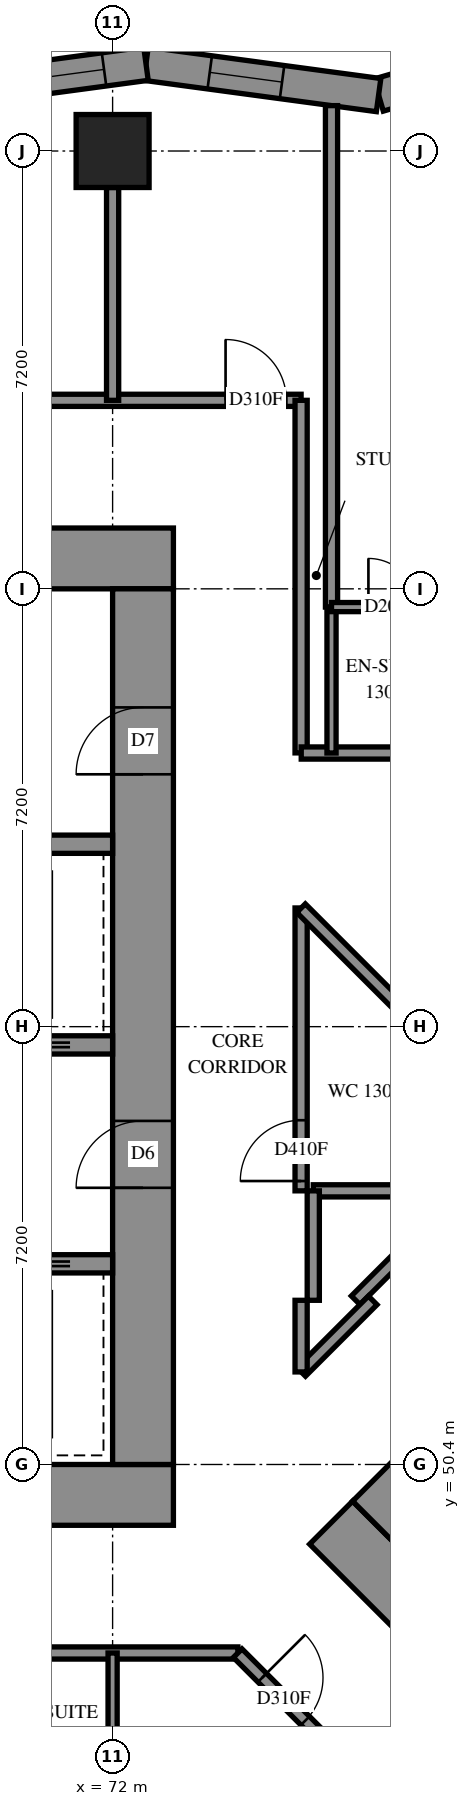
"""IFC4 building model, lengths in metres.
Left out: names, types, materials, properties, quantities, classifications, styles, units other than length and angle.
Written with IfcOpenShell. Run it as: python <this file> out.ifc"""

import sys

from ifc_helpers import new_model, si_unit, direction, frame, frame_2d, origin, origin_2d, place, context, subcontext, project, spatial, polyline, rectangle, outline, extrude, element, fill, save


model = new_model("IFC4")
c1 = context("Model", 3, precision=1e-05, world=origin(), true_north=direction((0.0, 1.0)))
c2 = subcontext(c1, "Body", "Model", "MODEL_VIEW")
j1 = project(units=[si_unit("LENGTHUNIT", "METRE"), si_unit("PLANEANGLEUNIT", "RADIAN")], contexts=[c1])
p1 = place(None, origin())
s1 = spatial("IfcSite", under=j1, at=p1, CompositionType="ELEMENT")
p2 = place(p1, origin())
s2 = spatial("IfcBuilding", under=s1, at=p2, CompositionType="ELEMENT")
p3 = place(p2, frame((0.0, 0.0, 50.8)))
s3 = spatial("IfcBuildingStorey", under=s2, at=p3, CompositionType="ELEMENT", Elevation=50.8)
p4 = place(p3, frame((72.0, 72.0, 0.0), z_axis=(0.0, 0.0, 1.0), x_axis=(1.0, 0.0, 0.0)))
e1 = element("IfcColumn", 1, at=p4, inside=s3, PredefinedType="COLUMN", context=c2, shape_type="SweptSolid", body=[
    extrude(rectangle(XDim=1.2, YDim=1.2, at=origin_2d()), origin(), (0.0, 0.0, 1.0), 3.1),
])
p5 = place(p3, frame((56.6, 49.9, -0.3), z_axis=(0.0, 0.0, 1.0), x_axis=(1.0, 0.0, 0.0)))
e2 = element("IfcWall", 2, at=p5, inside=s3, PredefinedType="SHEAR", context=c2, shape_type="SweptSolid", body=[
    extrude(rectangle(XDim=16.4, YDim=1.0, at=frame_2d((8.2, 0.0))), origin(), (0.0, 0.0, 1.0), 2.7),
])
p6 = place(p3, frame((56.6, 65.3, -0.3), z_axis=(0.0, 0.0, 1.0), x_axis=(1.0, 0.0, 0.0)))
e3 = element("IfcWall", 3, at=p6, inside=s3, PredefinedType="SHEAR", context=c2, shape_type="SweptSolid", body=[
    extrude(rectangle(XDim=16.4, YDim=1.0, at=frame_2d((8.2, 0.0))), origin(), (0.0, 0.0, 1.0), 2.7),
])
p7 = place(p6, frame((11.0, 0.0, 0.3)))
e4 = element("IfcOpeningElement", 4, at=p7, cuts=e3, PredefinedType="OPENING", context=c2, shape_type="SweptSolid", body=[
    extrude(rectangle(XDim=0.8, YDim=2.1, at=frame_2d((0.4, 1.05))), frame((0.0, 0.51, 0.0), z_axis=(0.0, -1.0, 0.0), x_axis=(1.0, 0.0, 0.0)), (0.0, 0.0, 1.0), 1.02),
])
p8 = place(p3, frame((72.5, 50.4, -0.3), z_axis=(0.0, 0.0, 1.0), x_axis=(0.0, 1.0, 0.0)))
e5 = element("IfcWall", 5, at=p8, inside=s3, PredefinedType="SHEAR", context=c2, shape_type="SweptSolid", body=[
    extrude(rectangle(XDim=14.4, YDim=1.0, at=frame_2d((7.2, 0.0))), origin(), (0.0, 0.0, 1.0), 2.7),
])
p9 = place(p8, frame((4.55, 0.0, 0.3)))
e6 = element("IfcOpeningElement", 6, at=p9, cuts=e5, PredefinedType="OPENING", context=c2, shape_type="SweptSolid", body=[
    extrude(rectangle(XDim=1.1, YDim=2.1, at=frame_2d((0.55, 1.05))), frame((0.0, 0.51, 0.0), z_axis=(0.0, -1.0, 0.0), x_axis=(1.0, 0.0, 0.0)), (0.0, 0.0, 1.0), 1.02),
])
p10 = place(p8, frame((11.35, 0.0, 0.3)))
e7 = element("IfcOpeningElement", 7, at=p10, cuts=e5, PredefinedType="OPENING", context=c2, shape_type="SweptSolid", body=[
    extrude(rectangle(XDim=1.1, YDim=2.1, at=frame_2d((0.55, 1.05))), frame((0.0, 0.51, 0.0), z_axis=(0.0, -1.0, 0.0), x_axis=(1.0, 0.0, 0.0)), (0.0, 0.0, 1.0), 1.02),
])
p11 = place(p3, frame((57.6, 53.7, 0.0), z_axis=(0.0, 0.0, 1.0), x_axis=(1.0, 0.0, 0.0)))
e8 = element("IfcWall", 8, at=p11, inside=s3, PredefinedType="SOLIDWALL", context=c2, shape_type="SweptSolid", body=[
    extrude(rectangle(XDim=14.4, YDim=0.3, at=frame_2d((7.2, 0.0))), origin(), (0.0, 0.0, 1.0), 3.1),
])
p12 = place(p11, frame((1.25, 0.0, 0.0)))
e9 = element("IfcOpeningElement", 9, at=p12, cuts=e8, PredefinedType="OPENING", context=c2, shape_type="SweptSolid", body=[
    extrude(rectangle(XDim=1.1, YDim=2.1, at=frame_2d((0.55, 1.05))), frame((0.0, 0.16, 0.0), z_axis=(0.0, -1.0, 0.0), x_axis=(1.0, 0.0, 0.0)), (0.0, 0.0, 1.0), 0.32),
])
p13 = place(p11, frame((4.85, 0.0, 0.0)))
e10 = element("IfcOpeningElement", 10, at=p13, cuts=e8, PredefinedType="OPENING", context=c2, shape_type="SweptSolid", body=[
    extrude(rectangle(XDim=1.1, YDim=2.1, at=frame_2d((0.55, 1.05))), frame((0.0, 0.16, 0.0), z_axis=(0.0, -1.0, 0.0), x_axis=(1.0, 0.0, 0.0)), (0.0, 0.0, 1.0), 0.32),
])
p14 = place(p11, frame((8.45, 0.0, 0.0)))
e11 = element("IfcOpeningElement", 11, at=p14, cuts=e8, PredefinedType="OPENING", context=c2, shape_type="SweptSolid", body=[
    extrude(rectangle(XDim=1.1, YDim=2.1, at=frame_2d((0.55, 1.05))), frame((0.0, 0.16, 0.0), z_axis=(0.0, -1.0, 0.0), x_axis=(1.0, 0.0, 0.0)), (0.0, 0.0, 1.0), 0.32),
])
p15 = place(p11, frame((12.05, 0.0, 0.0)))
e12 = element("IfcOpeningElement", 12, at=p15, cuts=e8, PredefinedType="OPENING", context=c2, shape_type="SweptSolid", body=[
    extrude(rectangle(XDim=1.1, YDim=2.1, at=frame_2d((0.55, 1.05))), frame((0.0, 0.16, 0.0), z_axis=(0.0, -1.0, 0.0), x_axis=(1.0, 0.0, 0.0)), (0.0, 0.0, 1.0), 0.32),
])
p16 = place(p3, frame((57.6, 57.3, 0.0), z_axis=(0.0, 0.0, 1.0), x_axis=(1.0, 0.0, 0.0)))
e13 = element("IfcWall", 13, at=p16, inside=s3, PredefinedType="SOLIDWALL", context=c2, shape_type="SweptSolid", body=[
    extrude(rectangle(XDim=14.4, YDim=0.3, at=frame_2d((7.2, 0.0))), origin(), (0.0, 0.0, 1.0), 3.1),
])
p17 = place(p16, frame((12.05, 0.0, 0.0)))
e14 = element("IfcOpeningElement", 14, at=p17, cuts=e13, PredefinedType="OPENING", context=c2, shape_type="SweptSolid", body=[
    extrude(rectangle(XDim=1.1, YDim=2.1, at=frame_2d((0.55, 1.05))), frame((0.0, 0.16, 0.0), z_axis=(0.0, -1.0, 0.0), x_axis=(1.0, 0.0, 0.0)), (0.0, 0.0, 1.0), 0.32),
])
p18 = place(p3, frame((64.8, 60.6, 0.0), z_axis=(0.0, 0.0, 1.0), x_axis=(1.0, 0.0, 0.0)))
e15 = element("IfcWall", 15, at=p18, inside=s3, PredefinedType="SOLIDWALL", context=c2, shape_type="SweptSolid", body=[
    extrude(rectangle(XDim=7.2, YDim=0.3, at=frame_2d((3.6, 0.0))), origin(), (0.0, 0.0, 1.0), 3.1),
])
p19 = place(p3, frame((75.594, 49.443, -0.3), z_axis=(0.0, 0.0, 1.0), x_axis=(0.7071037324, -0.70710983, 0.0)))
e16 = element("IfcWall", 16, at=p19, inside=s3, PredefinedType="SHEAR", context=c2, shape_type="SweptSolid", body=[
    extrude(rectangle(XDim=16.4, YDim=1.0, at=frame_2d((8.2, 0.0))), origin(), (0.0, 0.0, 1.0), 2.7),
])
p20 = place(p3, frame((76.301, 49.443, -0.3), z_axis=(0.0, 0.0, 1.0), x_axis=(0.7071067812, 0.7071067812, 0.0)))
e17 = element("IfcWall", 17, at=p20, inside=s3, PredefinedType="SHEAR", context=c2, shape_type="SweptSolid", body=[
    extrude(rectangle(XDim=14.4, YDim=1.0, at=frame_2d((7.2, 0.0))), origin(), (0.0, 0.0, 1.0), 2.7),
])
p21 = place(p20, frame((4.55, 0.0, 0.3)))
e18 = element("IfcOpeningElement", 18, at=p21, cuts=e17, PredefinedType="OPENING", context=c2, shape_type="SweptSolid", body=[
    extrude(rectangle(XDim=1.1, YDim=2.1, at=frame_2d((0.55, 1.05))), frame((0.0, 0.51, 0.0), z_axis=(0.0, -1.0, 0.0), x_axis=(1.0, 0.0, 0.0)), (0.0, 0.0, 1.0), 1.02),
])
p22 = place(p20, frame((11.35, 0.0, 0.3)))
e19 = element("IfcOpeningElement", 19, at=p22, cuts=e17, PredefinedType="OPENING", context=c2, shape_type="SweptSolid", body=[
    extrude(rectangle(XDim=1.1, YDim=2.1, at=frame_2d((0.55, 1.05))), frame((0.0, 0.51, 0.0), z_axis=(0.0, -1.0, 0.0), x_axis=(1.0, 0.0, 0.0)), (0.0, 0.0, 1.0), 1.02),
])
p23 = place(p3, frame((80.016, 73.984, 0.0), z_axis=(0.0, 0.0, 1.0), x_axis=(-0.9598383765, -0.280553544, 0.0)))
e20 = element("IfcWall", 20, at=p23, inside=s3, PredefinedType="SOLIDWALL", context=c2, shape_type="SweptSolid", body=[
    extrude(outline(polyline([(-0.228, -0.275), (3.736, -0.275), (3.853, 0.275), (0.228, 0.275), (-0.228, -0.275)])), origin(), (0.0, 0.0, 1.0), 3.1),
])
p24 = place(p23, frame((1.622, 0.0, 0.5)))
e21 = element("IfcOpeningElement", 21, at=p24, cuts=e20, PredefinedType="OPENING", context=c2, shape_type="SweptSolid", body=[
    extrude(rectangle(XDim=1.2, YDim=2.45, at=frame_2d((0.6, 1.225))), frame((0.0, 0.285, 0.0), z_axis=(0.0, -1.0, 0.0), x_axis=(1.0, 0.0, 0.0)), (0.0, 0.0, 1.0), 0.57),
])
p25 = place(p3, frame((76.374, 72.92, 0.0), z_axis=(0.0, 0.0, 1.0), x_axis=(-0.9910665233, 0.1333684607, 0.0)))
e22 = element("IfcWall", 22, at=p25, inside=s3, PredefinedType="SOLIDWALL", context=c2, shape_type="SweptSolid", body=[
    extrude(outline(polyline([(0.058, -0.275), (3.897, -0.275), (3.823, 0.275), (-0.058, 0.275), (0.058, -0.275)])), origin(), (0.0, 0.0, 1.0), 3.1),
])
p26 = place(p25, frame((1.602, 0.0, 0.5)))
e23 = element("IfcOpeningElement", 23, at=p26, cuts=e22, PredefinedType="OPENING", context=c2, shape_type="SweptSolid", body=[
    extrude(rectangle(XDim=1.2, YDim=2.45, at=frame_2d((0.6, 1.225))), frame((0.0, 0.285, 0.0), z_axis=(0.0, -1.0, 0.0), x_axis=(1.0, 0.0, 0.0)), (0.0, 0.0, 1.0), 0.57),
])
p27 = place(p3, frame((72.549, 73.434, 0.0), z_axis=(0.0, 0.0, 1.0), x_axis=(-0.9910651652, -0.1333785524, 0.0)))
e24 = element("IfcWall", 24, at=p27, inside=s3, PredefinedType="SOLIDWALL", context=c2, shape_type="SweptSolid", body=[
    extrude(outline(polyline([(-0.037, -0.275), (3.802, -0.275), (3.876, 0.275), (0.037, 0.275), (-0.037, -0.275)])), origin(), (0.0, 0.0, 1.0), 3.1),
])
p28 = place(p27, frame((0.696, 0.0, 0.5)))
e25 = element("IfcOpeningElement", 25, at=p28, cuts=e24, PredefinedType="OPENING", context=c2, shape_type="SweptSolid", body=[
    extrude(rectangle(XDim=2.8, YDim=2.45, at=frame_2d((1.4, 1.225))), frame((0.0, 0.285, 0.0), z_axis=(0.0, -1.0, 0.0), x_axis=(1.0, 0.0, 0.0)), (0.0, 0.0, 1.0), 0.57),
])
p29 = place(p3, frame((54.5, 67.9, 0.0), z_axis=(0.0, 0.0, 1.0), x_axis=(1.0, 0.0, 0.0)))
e26 = element("IfcWall", 26, at=p29, inside=s3, PredefinedType="PARTITIONING", context=c2, shape_type="SweptSolid", body=[
    extrude(rectangle(XDim=20.6, YDim=0.2, at=frame_2d((10.3, 0.0))), origin(), (0.0, 0.0, 1.0), 3.1),
])
p30 = place(p29, frame((0.198, 0.0, 0.0)))
e27 = element("IfcOpeningElement", 27, at=p30, cuts=e26, PredefinedType="OPENING", context=c2, shape_type="SweptSolid", body=[
    extrude(rectangle(XDim=1.0, YDim=2.1, at=frame_2d((0.5, 1.05))), frame((0.0, 0.11, 0.0), z_axis=(0.0, -1.0, 0.0), x_axis=(1.0, 0.0, 0.0)), (0.0, 0.0, 1.0), 0.22),
])
p31 = place(p29, frame((19.358, 0.0, 0.0)))
e28 = element("IfcOpeningElement", 28, at=p31, cuts=e26, PredefinedType="OPENING", context=c2, shape_type="SweptSolid", body=[
    extrude(rectangle(XDim=1.0, YDim=2.1, at=frame_2d((0.5, 1.05))), frame((0.0, 0.11, 0.0), z_axis=(0.0, -1.0, 0.0), x_axis=(1.0, 0.0, 0.0)), (0.0, 0.0, 1.0), 0.22),
])
p32 = place(p29, frame((6.698, 0.0, 0.0)))
e29 = element("IfcOpeningElement", 29, at=p32, cuts=e26, PredefinedType="OPENING", context=c2, shape_type="SweptSolid", body=[
    extrude(rectangle(XDim=0.9, YDim=2.1, at=frame_2d((0.45, 1.05))), frame((0.0, 0.11, 0.0), z_axis=(0.0, -1.0, 0.0), x_axis=(1.0, 0.0, 0.0)), (0.0, 0.0, 1.0), 0.22),
])
p33 = place(p29, frame((13.884, 0.0, 0.0)))
e30 = element("IfcOpeningElement", 30, at=p33, cuts=e26, PredefinedType="OPENING", context=c2, shape_type="SweptSolid", body=[
    extrude(rectangle(XDim=1.0, YDim=2.1, at=frame_2d((0.5, 1.05))), frame((0.0, 0.11, 0.0), z_axis=(0.0, -1.0, 0.0), x_axis=(1.0, 0.0, 0.0)), (0.0, 0.0, 1.0), 0.22),
])
p34 = place(p3, frame((54.5, 47.3, 0.0), z_axis=(0.0, 0.0, 1.0), x_axis=(1.0, 0.0, 0.0)))
e31 = element("IfcWall", 31, at=p34, inside=s3, PredefinedType="PARTITIONING", context=c2, shape_type="SweptSolid", body=[
    extrude(rectangle(XDim=19.56, YDim=0.2, at=frame_2d((9.78, 0.0))), origin(), (0.0, 0.0, 1.0), 3.1),
])
p35 = place(p34, frame((0.23, 0.0, 0.0)))
e32 = element("IfcOpeningElement", 32, at=p35, cuts=e31, PredefinedType="OPENING", context=c2, shape_type="SweptSolid", body=[
    extrude(rectangle(XDim=1.0, YDim=2.1, at=frame_2d((0.5, 1.05))), frame((0.0, 0.11, 0.0), z_axis=(0.0, -1.0, 0.0), x_axis=(1.0, 0.0, 0.0)), (0.0, 0.0, 1.0), 0.22),
])
p36 = place(p34, frame((5.4, 0.0, 0.0)))
e33 = element("IfcOpeningElement", 33, at=p36, cuts=e31, PredefinedType="OPENING", context=c2, shape_type="SweptSolid", body=[
    extrude(rectangle(XDim=0.9, YDim=2.1, at=frame_2d((0.45, 1.05))), frame((0.0, 0.11, 0.0), z_axis=(0.0, -1.0, 0.0), x_axis=(1.0, 0.0, 0.0)), (0.0, 0.0, 1.0), 0.22),
])
p37 = place(p34, frame((9.001, 0.0, 0.0)))
e34 = element("IfcOpeningElement", 34, at=p37, cuts=e31, PredefinedType="OPENING", context=c2, shape_type="SweptSolid", body=[
    extrude(rectangle(XDim=0.9, YDim=2.1, at=frame_2d((0.45, 1.05))), frame((0.0, 0.11, 0.0), z_axis=(0.0, -1.0, 0.0), x_axis=(1.0, 0.0, 0.0)), (0.0, 0.0, 1.0), 0.22),
])
p38 = place(p34, frame((14.3, 0.0, 0.0)))
e35 = element("IfcOpeningElement", 35, at=p38, cuts=e31, PredefinedType="OPENING", context=c2, shape_type="SweptSolid", body=[
    extrude(rectangle(XDim=0.9, YDim=2.1, at=frame_2d((0.45, 1.05))), frame((0.0, 0.11, 0.0), z_axis=(0.0, -1.0, 0.0), x_axis=(1.0, 0.0, 0.0)), (0.0, 0.0, 1.0), 0.22),
])
p39 = place(p3, frame((75.6, 64.5, 0.0), z_axis=(0.0, 0.0, 1.0), x_axis=(0.0, 1.0, 0.0)))
e36 = element("IfcWall", 36, at=p39, inside=s3, PredefinedType="PARTITIONING", context=c2, shape_type="SweptSolid", body=[
    extrude(rectangle(XDim=8.246, YDim=0.2, at=frame_2d((4.123, 0.0))), origin(), (0.0, 0.0, 1.0), 3.1),
])
p40 = place(p3, frame((75.1, 62.102, 0.0), z_axis=(0.0, 0.0, 1.0), x_axis=(0.0, 1.0, 0.0)))
e37 = element("IfcWall", 37, at=p40, inside=s3, PredefinedType="PARTITIONING", context=c2, shape_type="SweptSolid", body=[
    extrude(rectangle(XDim=5.798, YDim=0.2, at=frame_2d((2.899, 0.0))), origin(), (0.0, 0.0, 1.0), 3.1),
])
p41 = place(p3, frame((74.057, 47.297, 0.0), z_axis=(0.0, 0.0, 1.0), x_axis=(0.7071067812, -0.7071067812, 0.0)))
e38 = element("IfcWall", 38, at=p41, inside=s3, PredefinedType="PARTITIONING", context=c2, shape_type="SweptSolid", body=[
    extrude(rectangle(XDim=4.653, YDim=0.2, at=frame_2d((2.326, 0.0))), origin(), (0.0, 0.0, 1.0), 3.1),
])
p42 = place(p41, frame((0.57, 0.0, 0.0)))
e39 = element("IfcOpeningElement", 39, at=p42, cuts=e38, PredefinedType="OPENING", context=c2, shape_type="SweptSolid", body=[
    extrude(rectangle(XDim=1.0, YDim=2.1, at=frame_2d((0.5, 1.05))), frame((0.0, 0.11, 0.0), z_axis=(0.0, -1.0, 0.0), x_axis=(1.0, 0.0, 0.0)), (0.0, 0.0, 1.0), 0.22),
])
p43 = place(p3, frame((75.1, 54.9, 0.0), z_axis=(0.0, 0.0, 1.0), x_axis=(0.0, 1.0, 0.0)))
e40 = element("IfcWall", 40, at=p43, inside=s3, PredefinedType="PARTITIONING", context=c2, shape_type="SweptSolid", body=[
    extrude(rectangle(XDim=4.652, YDim=0.2, at=frame_2d((2.326, 0.0))), origin(), (0.0, 0.0, 1.0), 3.1),
])
p44 = place(p43, frame((0.161, 0.0, 0.0)))
e41 = element("IfcOpeningElement", 41, at=p44, cuts=e40, PredefinedType="OPENING", context=c2, shape_type="SweptSolid", body=[
    extrude(rectangle(XDim=1.0, YDim=2.1, at=frame_2d((0.5, 1.05))), frame((0.0, 0.11, 0.0), z_axis=(0.0, -1.0, 0.0), x_axis=(1.0, 0.0, 0.0)), (0.0, 0.0, 1.0), 0.22),
])
p45 = place(p3, frame((75.102, 62.1, 0.0), z_axis=(0.0, 0.0, 1.0), x_axis=(1.0, 0.0, 0.0)))
e42 = element("IfcWall", 42, at=p45, inside=s3, PredefinedType="PARTITIONING", context=c2, shape_type="SweptSolid", body=[
    extrude(rectangle(XDim=4.098, YDim=0.2, at=frame_2d((2.049, 0.0))), origin(), (0.0, 0.0, 1.0), 3.1),
])
p46 = place(p45, frame((2.848, 0.0, 0.0)))
e43 = element("IfcOpeningElement", 43, at=p46, cuts=e42, PredefinedType="OPENING", context=c2, shape_type="SweptSolid", body=[
    extrude(rectangle(XDim=0.9, YDim=2.1, at=frame_2d((0.45, 1.05))), frame((0.0, 0.11, 0.0), z_axis=(0.0, -1.0, 0.0), x_axis=(1.0, 0.0, 0.0)), (0.0, 0.0, 1.0), 0.22),
])
p47 = place(p3, frame((72.0, 67.9, 0.0), z_axis=(0.0, 0.0, 1.0), x_axis=(0.0, 1.0, 0.0)))
e44 = element("IfcWall", 44, at=p47, inside=s3, PredefinedType="PARTITIONING", context=c2, shape_type="SweptSolid", body=[
    extrude(rectangle(XDim=3.5, YDim=0.2, at=frame_2d((1.75, 0.0))), origin(), (0.0, 0.0, 1.0), 3.1),
])
p48 = place(p3, frame((75.099, 59.549, 0.0), z_axis=(0.0, 0.0, 1.0), x_axis=(0.7071067812, -0.7071067812, 0.0)))
e45 = element("IfcWall", 45, at=p48, inside=s3, PredefinedType="PARTITIONING", context=c2, shape_type="SweptSolid", body=[
    extrude(rectangle(XDim=3.179, YDim=0.2, at=frame_2d((1.59, 0.0))), origin(), (0.0, 0.0, 1.0), 3.1),
])
p49 = place(p3, frame((75.997, 53.101, 0.0), z_axis=(0.0, 0.0, 1.0), x_axis=(0.7071067812, 0.7071067812, 0.0)))
e46 = element("IfcWall", 46, at=p49, inside=s3, PredefinedType="PARTITIONING", context=c2, shape_type="SweptSolid", body=[
    extrude(rectangle(XDim=2.546, YDim=0.2, at=frame_2d((1.273, 0.0))), origin(), (0.0, 0.0, 1.0), 3.1),
])
p50 = place(p3, frame((75.3, 54.9, 0.0), z_axis=(0.0, 0.0, 1.0), x_axis=(1.0, 0.0, 0.0)))
e47 = element("IfcWall", 47, at=p50, inside=s3, PredefinedType="PARTITIONING", context=c2, shape_type="SweptSolid", body=[
    extrude(rectangle(XDim=2.498, YDim=0.2, at=frame_2d((1.249, 0.0))), origin(), (0.0, 0.0, 1.0), 3.1),
])
for number, where, z_axis, x_axis in (
    (48, (72.0, 44.9, 0.0), (0.0, 0.0, 1.0), (0.0, 1.0, 0.0)),
    (49, (75.6, 62.1, 0.0), (0.0, 0.0, 1.0), (0.0, 1.0, 0.0)),
):
    element("IfcWall", number, at=place(p3, frame(where, z_axis=z_axis, x_axis=x_axis)), inside=s3, PredefinedType="PARTITIONING", context=c2, shape_type="SweptSolid", body=[
        extrude(rectangle(XDim=2.4, YDim=0.15, at=frame_2d((1.2, 0.0))), origin(), (0.0, 0.0, 1.0), 3.1),
    ])
p51 = place(p3, frame((75.6, 64.5, 0.0), z_axis=(0.0, 0.0, 1.0), x_axis=(1.0, 0.0, 0.0)))
e50 = element("IfcWall", 50, at=p51, inside=s3, PredefinedType="PARTITIONING", context=c2, shape_type="SweptSolid", body=[
    extrude(rectangle(XDim=1.9, YDim=0.15, at=frame_2d((0.95, 0.0))), origin(), (0.0, 0.0, 1.0), 3.1),
])
p52 = place(p51, frame((0.607, 0.0, 0.0)))
e51 = element("IfcOpeningElement", 51, at=p52, cuts=e50, PredefinedType="OPENING", context=c2, shape_type="SweptSolid", body=[
    extrude(rectangle(XDim=0.8, YDim=2.1, at=frame_2d((0.4, 1.05))), frame((0.0, 0.085, 0.0), z_axis=(0.0, -1.0, 0.0), x_axis=(1.0, 0.0, 0.0)), (0.0, 0.0, 1.0), 0.17),
])
p53 = place(p3, frame((75.3, 53.1, 0.0), z_axis=(0.0, 0.0, 1.0), x_axis=(0.0, 1.0, 0.0)))
e52 = element("IfcWall", 52, at=p53, inside=s3, PredefinedType="PARTITIONING", context=c2, shape_type="SweptSolid", body=[
    extrude(rectangle(XDim=1.8, YDim=0.2, at=frame_2d((0.9, 0.0))), origin(), (0.0, 0.0, 1.0), 3.1),
])
p54 = place(p3, frame((75.102, 51.922, 0.0), z_axis=(0.0, 0.0, 1.0), x_axis=(0.7071067812, 0.7071067812, 0.0)))
e53 = element("IfcWall", 53, at=p54, inside=s3, PredefinedType="PARTITIONING", context=c2, shape_type="SweptSolid", body=[
    extrude(rectangle(XDim=1.663, YDim=0.2, at=frame_2d((0.832, 0.0))), origin(), (0.0, 0.0, 1.0), 3.1),
])
p55 = place(p3, frame((75.1, 51.922, 0.0), z_axis=(0.0, 0.0, 1.0), x_axis=(0.0, 1.0, 0.0)))
e54 = element("IfcWall", 54, at=p55, inside=s3, PredefinedType="PARTITIONING", context=c2, shape_type="SweptSolid", body=[
    extrude(rectangle(XDim=1.178, YDim=0.2, at=frame_2d((0.589, 0.0))), origin(), (0.0, 0.0, 1.0), 3.1),
])
p56 = place(p26, origin())
e55 = element("IfcWindow", 55, at=p56, inside=s3, PartitioningType="SINGLE_PANEL", PredefinedType="WINDOW", context=c2, shape_type="SweptSolid", body=[
    extrude(rectangle(XDim=1.2, YDim=2.45, at=frame_2d((0.6, 1.225))), frame((0.0, 0.155, 0.0), z_axis=(0.0, -1.0, 0.0), x_axis=(1.0, 0.0, 0.0)), (0.0, 0.0, 1.0), 0.06),
])
fill(e23, e55)
p57 = place(p28, origin())
e56 = element("IfcWindow", 56, at=p57, inside=s3, PartitioningType="SINGLE_PANEL", PredefinedType="WINDOW", context=c2, shape_type="SweptSolid", body=[
    extrude(rectangle(XDim=2.8, YDim=2.45, at=frame_2d((1.4, 1.225))), frame((0.0, 0.155, 0.0), z_axis=(0.0, -1.0, 0.0), x_axis=(1.0, 0.0, 0.0)), (0.0, 0.0, 1.0), 0.06),
])
fill(e25, e56)
p58 = place(p9, origin())
e57 = element("IfcDoor", 57, at=p58, inside=s3, OperationType="DOUBLE_DOOR_SINGLE_SWING", PredefinedType="DOOR", context=c2, shape_type="SweptSolid", body=[
    extrude(rectangle(XDim=1.1, YDim=2.1, at=frame_2d((0.55, 1.05))), frame((0.0, 0.025, 0.0), z_axis=(0.0, -1.0, 0.0), x_axis=(1.0, 0.0, 0.0)), (0.0, 0.0, 1.0), 0.05),
])
fill(e6, e57)
p59 = place(p10, origin())
e58 = element("IfcDoor", 58, at=p59, inside=s3, OperationType="SINGLE_SWING_RIGHT", PredefinedType="DOOR", context=c2, shape_type="SweptSolid", body=[
    extrude(rectangle(XDim=1.1, YDim=2.1, at=frame_2d((0.55, 1.05))), frame((0.0, 0.025, 0.0), z_axis=(0.0, -1.0, 0.0), x_axis=(1.0, 0.0, 0.0)), (0.0, 0.0, 1.0), 0.05),
])
fill(e7, e58)
p60 = place(p44, origin())
e59 = element("IfcDoor", 59, at=p60, inside=s3, OperationType="SINGLE_SWING_LEFT", PredefinedType="DOOR", context=c2, shape_type="SweptSolid", body=[
    extrude(rectangle(XDim=1.0, YDim=2.1, at=frame_2d((0.5, 1.05))), frame((0.0, 0.025, 0.0), z_axis=(0.0, -1.0, 0.0), x_axis=(1.0, 0.0, 0.0)), (0.0, 0.0, 1.0), 0.05),
])
fill(e41, e59)
p61 = place(p31, origin())
e60 = element("IfcDoor", 60, at=p61, inside=s3, OperationType="SINGLE_SWING_RIGHT", PredefinedType="DOOR", context=c2, shape_type="SweptSolid", body=[
    extrude(rectangle(XDim=1.0, YDim=2.1, at=frame_2d((0.5, 1.05))), frame((0.0, 0.025, 0.0), z_axis=(0.0, -1.0, 0.0), x_axis=(1.0, 0.0, 0.0)), (0.0, 0.0, 1.0), 0.05),
])
fill(e28, e60)
p62 = place(p52, origin())
e61 = element("IfcDoor", 61, at=p62, inside=s3, OperationType="SINGLE_SWING_RIGHT", PredefinedType="DOOR", context=c2, shape_type="SweptSolid", body=[
    extrude(rectangle(XDim=0.8, YDim=2.1, at=frame_2d((0.4, 1.05))), frame((0.0, 0.025, 0.0), z_axis=(0.0, -1.0, 0.0), x_axis=(1.0, 0.0, 0.0)), (0.0, 0.0, 1.0), 0.05),
])
fill(e51, e61)
p63 = place(p42, origin())
e62 = element("IfcDoor", 62, at=p63, inside=s3, OperationType="SINGLE_SWING_LEFT", PredefinedType="DOOR", context=c2, shape_type="SweptSolid", body=[
    extrude(rectangle(XDim=1.0, YDim=2.1, at=frame_2d((0.5, 1.05))), frame((0.0, 0.025, 0.0), z_axis=(0.0, -1.0, 0.0), x_axis=(1.0, 0.0, 0.0)), (0.0, 0.0, 1.0), 0.05),
])
fill(e39, e62)
save(model, sys.argv[1])
